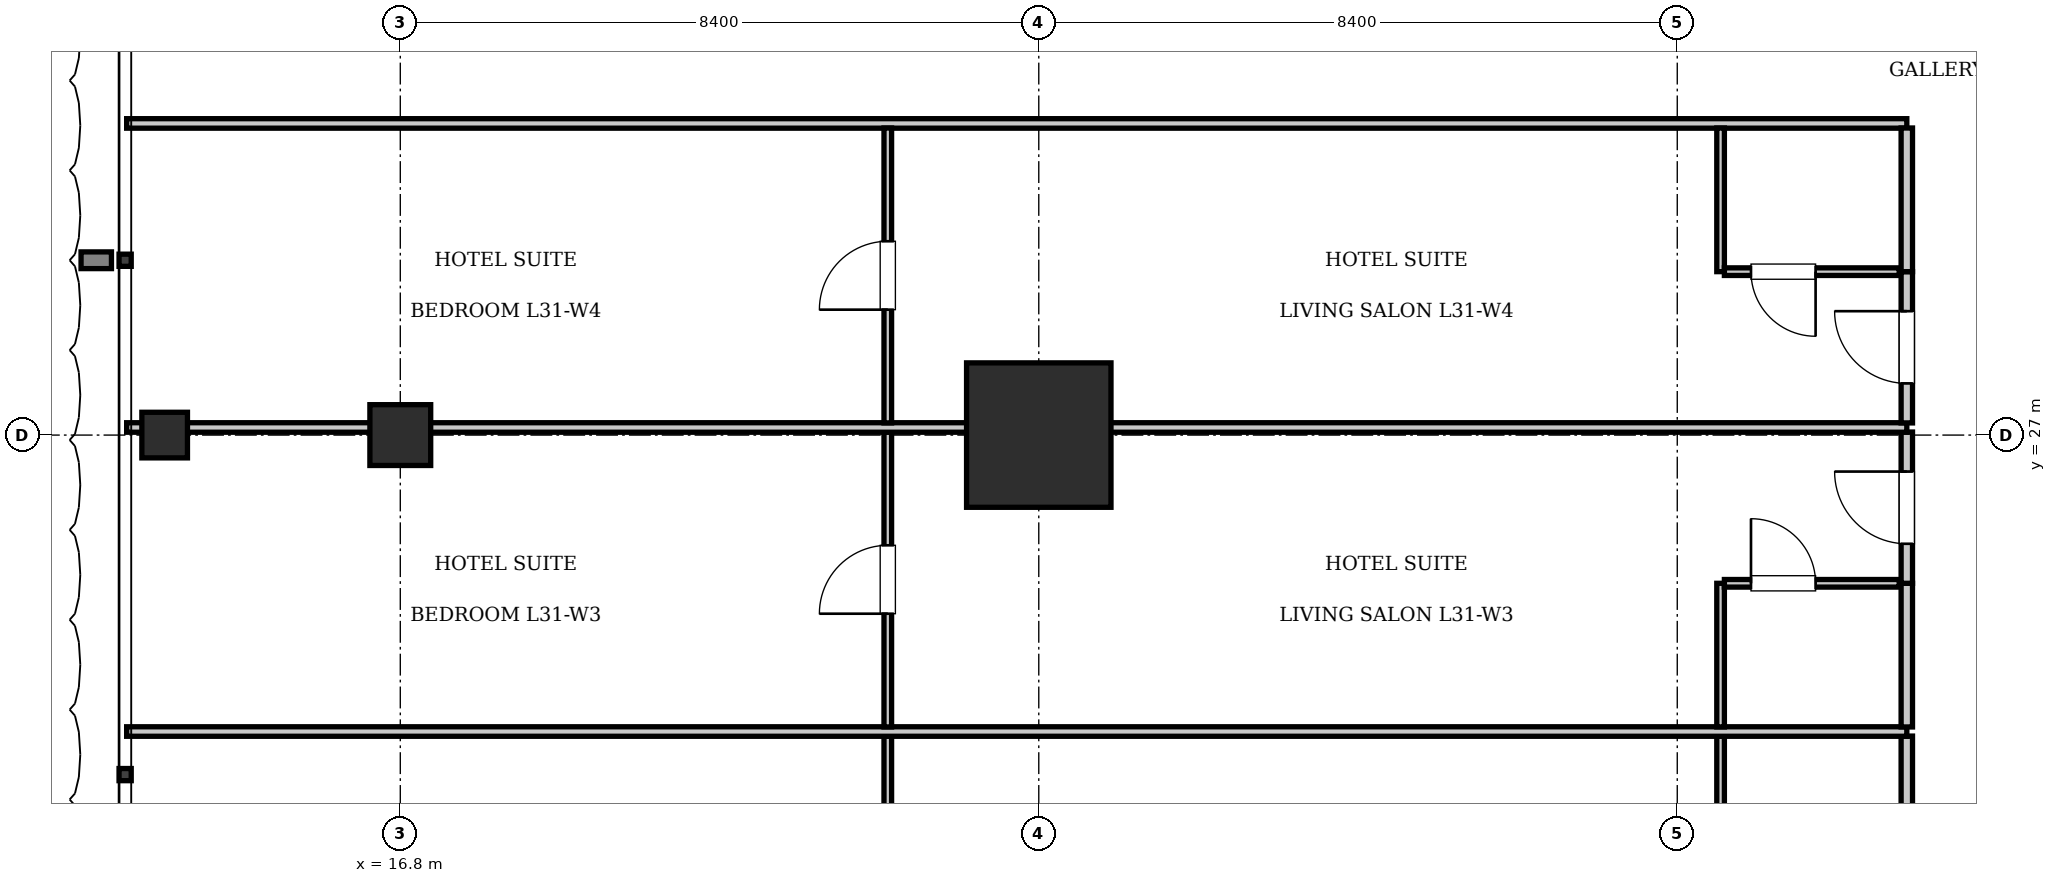
"""IFC4 building model, lengths in metres.
Left out: names, types, materials, properties, quantities, classifications, styles, units other than length and angle.
Written with IfcOpenShell. Run it as: python <this file> out.ifc"""

import sys

from ifc_helpers import new_model, si_unit, direction, frame, frame_2d, origin, origin_2d, place, context, subcontext, project, spatial, rectangle, i_section, extrude, element, fill, save


model = new_model("IFC4")
c1 = context("Model", 3, precision=1e-05, world=origin(), true_north=direction((0.0, 1.0)))
c2 = subcontext(c1, "Body", "Model", "MODEL_VIEW")
j1 = project(units=[si_unit("LENGTHUNIT", "METRE"), si_unit("PLANEANGLEUNIT", "RADIAN")], contexts=[c1])
p1 = place(None, origin())
s1 = spatial("IfcSite", under=j1, at=p1, CompositionType="ELEMENT")
p2 = place(p1, origin())
s2 = spatial("IfcBuilding", under=s1, at=p2, CompositionType="ELEMENT")
p3 = place(p2, frame((0.0, 0.0, 131.25)))
s3 = spatial("IfcBuildingStorey", under=s2, at=p3, CompositionType="ELEMENT", Elevation=131.25)
p4 = place(p3, frame((25.2, 27.0, 0.0), z_axis=(0.0, 0.0, 1.0), x_axis=(1.0, 0.0, 0.0)))
e1 = element("IfcColumn", 1, at=p4, inside=s3, PredefinedType="COLUMN", context=c2, shape_type="SweptSolid", body=[
    extrude(rectangle(XDim=1.9, YDim=1.9, at=origin_2d()), origin(), (0.0, 0.0, 1.0), 3.85),
])
p5 = place(p3, frame((16.8, 27.0, 0.0), z_axis=(0.0, 0.0, 1.0), x_axis=(1.0, 0.0, 0.0)))
e2 = element("IfcColumn", 2, at=p5, inside=s3, PredefinedType="COLUMN", context=c2, shape_type="SweptSolid", body=[
    extrude(rectangle(XDim=0.8, YDim=0.8, at=origin_2d()), origin(), (0.0, 0.0, 1.0), 3.85),
])
p6 = place(p3, frame((13.7, 27.0, 0.0), z_axis=(0.0, 0.0, 1.0), x_axis=(1.0, 0.0, 0.0)))
e3 = element("IfcColumn", 3, at=p6, inside=s3, PredefinedType="COLUMN", context=c2, shape_type="SweptSolid", body=[
    extrude(i_section(OverallWidth=0.6, OverallDepth=0.6, WebThickness=0.025, FlangeThickness=0.038, at=origin_2d()), origin(), (0.0, 0.0, 1.0), 3.85),
])
p7 = place(p3, frame((13.2, 31.1, 0.0), z_axis=(0.0, 0.0, 1.0), x_axis=(1.0, 0.0, 0.0)))
e4 = element("IfcWall", 4, at=p7, inside=s3, PredefinedType="PARTITIONING", context=c2, shape_type="SweptSolid", body=[
    extrude(rectangle(XDim=23.42, YDim=0.125, at=frame_2d((11.71, 0.0))), origin(), (0.0, 0.0, 1.0), 3.61),
])
p8 = place(p3, frame((36.62, 21.15, 0.0), z_axis=(0.0, 0.0, 1.0), x_axis=(0.0, 1.0, 0.0)))
e5 = element("IfcWall", 5, at=p8, inside=s3, PredefinedType="PARTITIONING", context=c2, shape_type="SweptSolid", body=[
    extrude(rectangle(XDim=1.89, YDim=0.15, at=frame_2d((0.945, 0.0))), origin(), (0.0, 0.0, 1.0), 3.61),
])
p9 = place(p3, frame((34.17, 21.15, 0.0), z_axis=(0.0, 0.0, 1.0), x_axis=(0.0, 1.0, 0.0)))
e6 = element("IfcWall", 6, at=p9, inside=s3, PredefinedType="PARTITIONING", context=c2, shape_type="SweptSolid", body=[
    extrude(rectangle(XDim=1.89, YDim=0.1, at=frame_2d((0.945, 0.0))), origin(), (0.0, 0.0, 1.0), 3.61),
])
p10 = place(p3, frame((23.214, 19.16, 0.0), z_axis=(0.0, 0.0, 1.0), x_axis=(0.0, 1.0, 0.0)))
e7 = element("IfcWall", 7, at=p10, inside=s3, PredefinedType="PARTITIONING", context=c2, shape_type="SweptSolid", body=[
    extrude(rectangle(XDim=3.88, YDim=0.1, at=frame_2d((1.94, 0.0))), origin(), (0.0, 0.0, 1.0), 3.61),
])
p11 = place(p10, frame((1.49, 0.0, 0.0)))
e8 = element("IfcOpeningElement", 8, at=p11, cuts=e7, PredefinedType="OPENING", context=c2, shape_type="SweptSolid", body=[
    extrude(rectangle(XDim=0.9, YDim=2.1, at=frame_2d((0.45, 1.05))), frame((0.0, 0.06, 0.0), z_axis=(0.0, -1.0, 0.0), x_axis=(1.0, 0.0, 0.0)), (0.0, 0.0, 1.0), 0.12),
])
p12 = place(p3, frame((13.2, 23.1, 0.0), z_axis=(0.0, 0.0, 1.0), x_axis=(1.0, 0.0, 0.0)))
e9 = element("IfcWall", 9, at=p12, inside=s3, PredefinedType="PARTITIONING", context=c2, shape_type="SweptSolid", body=[
    extrude(rectangle(XDim=23.42, YDim=0.125, at=frame_2d((11.71, 0.0))), origin(), (0.0, 0.0, 1.0), 3.61),
])
p13 = place(p3, frame((36.62, 23.16, 0.0), z_axis=(0.0, 0.0, 1.0), x_axis=(0.0, 1.0, 0.0)))
e10 = element("IfcWall", 10, at=p13, inside=s3, PredefinedType="PARTITIONING", context=c2, shape_type="SweptSolid", body=[
    extrude(rectangle(XDim=1.89, YDim=0.15, at=frame_2d((0.945, 0.0))), origin(), (0.0, 0.0, 1.0), 3.61),
])
p14 = place(p3, frame((36.62, 25.05, 0.0), z_axis=(0.0, 0.0, 1.0), x_axis=(0.0, 1.0, 0.0)))
e11 = element("IfcWall", 11, at=p14, inside=s3, PredefinedType="PARTITIONING", context=c2, shape_type="SweptSolid", body=[
    extrude(rectangle(XDim=1.99, YDim=0.15, at=frame_2d((0.995, 0.0))), origin(), (0.0, 0.0, 1.0), 3.61),
])
p15 = place(p14, frame((0.52, 0.0, 0.0)))
e12 = element("IfcOpeningElement", 12, at=p15, cuts=e11, PredefinedType="OPENING", context=c2, shape_type="SweptSolid", body=[
    extrude(rectangle(XDim=0.95, YDim=2.15, at=frame_2d((0.475, 1.075))), frame((0.0, 0.085, 0.0), z_axis=(0.0, -1.0, 0.0), x_axis=(1.0, 0.0, 0.0)), (0.0, 0.0, 1.0), 0.17),
])
p16 = place(p3, frame((34.17, 23.16, 0.0), z_axis=(0.0, 0.0, 1.0), x_axis=(0.0, 1.0, 0.0)))
e13 = element("IfcWall", 13, at=p16, inside=s3, PredefinedType="PARTITIONING", context=c2, shape_type="SweptSolid", body=[
    extrude(rectangle(XDim=1.89, YDim=0.1, at=frame_2d((0.945, 0.0))), origin(), (0.0, 0.0, 1.0), 3.61),
])
p17 = place(p3, frame((34.22, 25.05, 0.0), z_axis=(0.0, 0.0, 1.0), x_axis=(1.0, 0.0, 0.0)))
e14 = element("IfcWall", 14, at=p17, inside=s3, PredefinedType="PARTITIONING", context=c2, shape_type="SweptSolid", body=[
    extrude(rectangle(XDim=2.3, YDim=0.1, at=frame_2d((1.15, 0.0))), origin(), (0.0, 0.0, 1.0), 3.61),
])
p18 = place(p17, frame((0.35, 0.0, 0.0)))
e15 = element("IfcOpeningElement", 15, at=p18, cuts=e14, PredefinedType="OPENING", context=c2, shape_type="SweptSolid", body=[
    extrude(rectangle(XDim=0.85, YDim=2.1, at=frame_2d((0.425, 1.05))), frame((0.0, 0.06, 0.0), z_axis=(0.0, -1.0, 0.0), x_axis=(1.0, 0.0, 0.0)), (0.0, 0.0, 1.0), 0.12),
])
p19 = place(p3, frame((23.214, 23.16, 0.0), z_axis=(0.0, 0.0, 1.0), x_axis=(0.0, 1.0, 0.0)))
e16 = element("IfcWall", 16, at=p19, inside=s3, PredefinedType="PARTITIONING", context=c2, shape_type="SweptSolid", body=[
    extrude(rectangle(XDim=3.88, YDim=0.1, at=frame_2d((1.94, 0.0))), origin(), (0.0, 0.0, 1.0), 3.61),
])
p20 = place(p19, frame((1.49, 0.0, 0.0)))
e17 = element("IfcOpeningElement", 17, at=p20, cuts=e16, PredefinedType="OPENING", context=c2, shape_type="SweptSolid", body=[
    extrude(rectangle(XDim=0.9, YDim=2.1, at=frame_2d((0.45, 1.05))), frame((0.0, 0.06, 0.0), z_axis=(0.0, -1.0, 0.0), x_axis=(1.0, 0.0, 0.0)), (0.0, 0.0, 1.0), 0.12),
])
p21 = place(p3, frame((13.2, 27.1, 0.0), z_axis=(0.0, 0.0, 1.0), x_axis=(1.0, 0.0, 0.0)))
e18 = element("IfcWall", 18, at=p21, inside=s3, PredefinedType="PARTITIONING", context=c2, shape_type="SweptSolid", body=[
    extrude(rectangle(XDim=23.42, YDim=0.125, at=frame_2d((11.71, 0.0))), origin(), (0.0, 0.0, 1.0), 2.41),
])
p22 = place(p3, frame((36.62, 27.16, 0.0), z_axis=(0.0, 0.0, 1.0), x_axis=(0.0, 1.0, 0.0)))
e19 = element("IfcWall", 19, at=p22, inside=s3, PredefinedType="PARTITIONING", context=c2, shape_type="SweptSolid", body=[
    extrude(rectangle(XDim=1.99, YDim=0.15, at=frame_2d((0.995, 0.0))), origin(), (0.0, 0.0, 1.0), 3.61),
])
p23 = place(p22, frame((0.52, 0.0, 0.0)))
e20 = element("IfcOpeningElement", 20, at=p23, cuts=e19, PredefinedType="OPENING", context=c2, shape_type="SweptSolid", body=[
    extrude(rectangle(XDim=0.95, YDim=2.15, at=frame_2d((0.475, 1.075))), frame((0.0, 0.085, 0.0), z_axis=(0.0, -1.0, 0.0), x_axis=(1.0, 0.0, 0.0)), (0.0, 0.0, 1.0), 0.17),
])
p24 = place(p3, frame((36.62, 29.15, 0.0), z_axis=(0.0, 0.0, 1.0), x_axis=(0.0, 1.0, 0.0)))
e21 = element("IfcWall", 21, at=p24, inside=s3, PredefinedType="PARTITIONING", context=c2, shape_type="SweptSolid", body=[
    extrude(rectangle(XDim=1.89, YDim=0.15, at=frame_2d((0.945, 0.0))), origin(), (0.0, 0.0, 1.0), 3.61),
])
p25 = place(p3, frame((34.17, 29.15, 0.0), z_axis=(0.0, 0.0, 1.0), x_axis=(0.0, 1.0, 0.0)))
e22 = element("IfcWall", 22, at=p25, inside=s3, PredefinedType="PARTITIONING", context=c2, shape_type="SweptSolid", body=[
    extrude(rectangle(XDim=1.89, YDim=0.1, at=frame_2d((0.945, 0.0))), origin(), (0.0, 0.0, 1.0), 3.61),
])
p26 = place(p3, frame((34.22, 29.15, 0.0), z_axis=(0.0, 0.0, 1.0), x_axis=(1.0, 0.0, 0.0)))
e23 = element("IfcWall", 23, at=p26, inside=s3, PredefinedType="PARTITIONING", context=c2, shape_type="SweptSolid", body=[
    extrude(rectangle(XDim=2.3, YDim=0.1, at=frame_2d((1.15, 0.0))), origin(), (0.0, 0.0, 1.0), 3.61),
])
p27 = place(p26, frame((0.35, 0.0, 0.0)))
e24 = element("IfcOpeningElement", 24, at=p27, cuts=e23, PredefinedType="OPENING", context=c2, shape_type="SweptSolid", body=[
    extrude(rectangle(XDim=0.85, YDim=2.1, at=frame_2d((0.425, 1.05))), frame((0.0, 0.06, 0.0), z_axis=(0.0, -1.0, 0.0), x_axis=(1.0, 0.0, 0.0)), (0.0, 0.0, 1.0), 0.12),
])
p28 = place(p3, frame((23.214, 27.16, 0.0), z_axis=(0.0, 0.0, 1.0), x_axis=(0.0, 1.0, 0.0)))
e25 = element("IfcWall", 25, at=p28, inside=s3, PredefinedType="PARTITIONING", context=c2, shape_type="SweptSolid", body=[
    extrude(rectangle(XDim=3.88, YDim=0.1, at=frame_2d((1.94, 0.0))), origin(), (0.0, 0.0, 1.0), 3.61),
])
p29 = place(p28, frame((1.49, 0.0, 0.0)))
e26 = element("IfcOpeningElement", 26, at=p29, cuts=e25, PredefinedType="OPENING", context=c2, shape_type="SweptSolid", body=[
    extrude(rectangle(XDim=0.9, YDim=2.1, at=frame_2d((0.45, 1.05))), frame((0.0, 0.06, 0.0), z_axis=(0.0, -1.0, 0.0), x_axis=(1.0, 0.0, 0.0)), (0.0, 0.0, 1.0), 0.12),
])
p30 = place(p18, origin())
e27 = element("IfcDoor", 27, at=p30, inside=s3, OperationType="SINGLE_SWING_LEFT", PredefinedType="DOOR", context=c2, shape_type="SweptSolid", body=[
    extrude(rectangle(XDim=0.85, YDim=2.1, at=frame_2d((0.425, 1.05))), frame((0.0, 0.025, 0.0), z_axis=(0.0, -1.0, 0.0), x_axis=(1.0, 0.0, 0.0)), (0.0, 0.0, 1.0), 0.05),
])
fill(e15, e27)
p31 = place(p15, origin())
e28 = element("IfcDoor", 28, at=p31, inside=s3, OperationType="SINGLE_SWING_RIGHT", PredefinedType="DOOR", context=c2, shape_type="SweptSolid", body=[
    extrude(rectangle(XDim=0.95, YDim=2.15, at=frame_2d((0.475, 1.075))), frame((0.0, 0.025, 0.0), z_axis=(0.0, -1.0, 0.0), x_axis=(1.0, 0.0, 0.0)), (0.0, 0.0, 1.0), 0.05),
])
fill(e12, e28)
p32 = place(p20, origin())
e29 = element("IfcDoor", 29, at=p32, inside=s3, OperationType="SINGLE_SWING_LEFT", PredefinedType="DOOR", context=c2, shape_type="SweptSolid", body=[
    extrude(rectangle(XDim=0.9, YDim=2.1, at=frame_2d((0.45, 1.05))), frame((0.0, 0.025, 0.0), z_axis=(0.0, -1.0, 0.0), x_axis=(1.0, 0.0, 0.0)), (0.0, 0.0, 1.0), 0.05),
])
fill(e17, e29)
p33 = place(p27, frame((0.85, 0.0, 0.0), z_axis=(0.0, 0.0, 1.0), x_axis=(-1.0, 0.0, 0.0)))
e30 = element("IfcDoor", 30, at=p33, inside=s3, OperationType="SINGLE_SWING_LEFT", PredefinedType="DOOR", context=c2, shape_type="SweptSolid", body=[
    extrude(rectangle(XDim=0.85, YDim=2.1, at=frame_2d((0.425, 1.05))), frame((0.0, 0.025, 0.0), z_axis=(0.0, -1.0, 0.0), x_axis=(1.0, 0.0, 0.0)), (0.0, 0.0, 1.0), 0.05),
])
fill(e24, e30)
p34 = place(p23, origin())
e31 = element("IfcDoor", 31, at=p34, inside=s3, OperationType="SINGLE_SWING_RIGHT", PredefinedType="DOOR", context=c2, shape_type="SweptSolid", body=[
    extrude(rectangle(XDim=0.95, YDim=2.15, at=frame_2d((0.475, 1.075))), frame((0.0, 0.025, 0.0), z_axis=(0.0, -1.0, 0.0), x_axis=(1.0, 0.0, 0.0)), (0.0, 0.0, 1.0), 0.05),
])
fill(e20, e31)
p35 = place(p29, origin())
e32 = element("IfcDoor", 32, at=p35, inside=s3, OperationType="SINGLE_SWING_LEFT", PredefinedType="DOOR", context=c2, shape_type="SweptSolid", body=[
    extrude(rectangle(XDim=0.9, YDim=2.1, at=frame_2d((0.45, 1.05))), frame((0.0, 0.025, 0.0), z_axis=(0.0, -1.0, 0.0), x_axis=(1.0, 0.0, 0.0)), (0.0, 0.0, 1.0), 0.05),
])
fill(e26, e32)
save(model, sys.argv[1])
